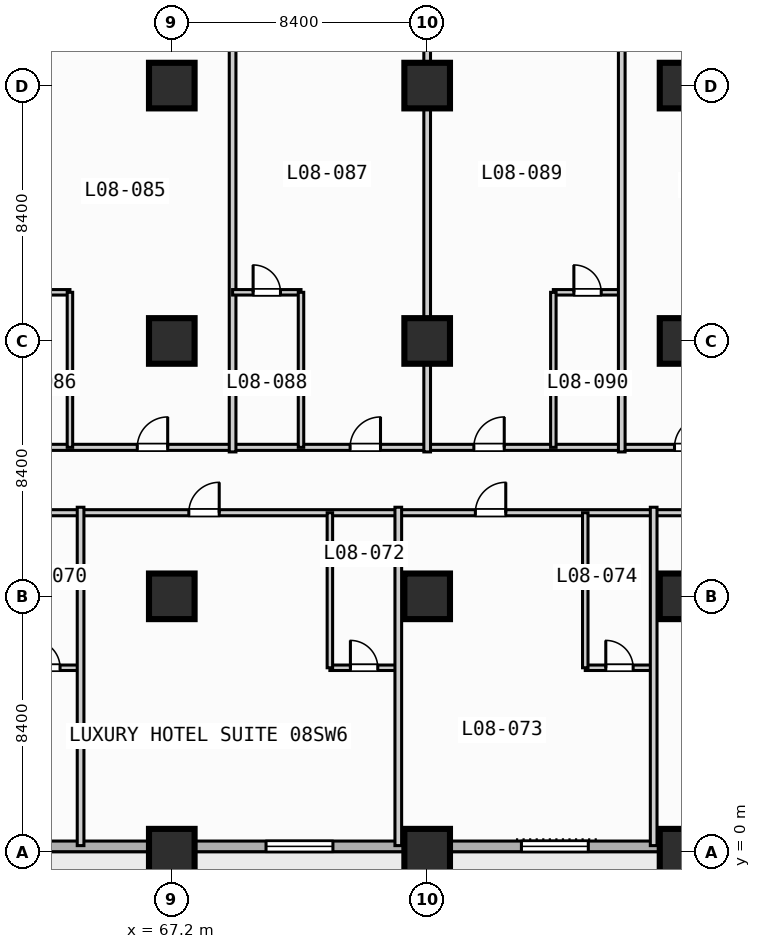
"""IFC4 building model, lengths in metres.
Left out: names, types, materials, properties, quantities, classifications, styles, units other than length and angle.
Written with IfcOpenShell. Run it as: python <this file> out.ifc"""

import sys

from ifc_helpers import new_model, si_unit, direction, frame, frame_2d, origin, origin_2d, place, context, subcontext, project, spatial, rectangle, extrude, element, fill, save


model = new_model("IFC4")
c1 = context("Model", 3, precision=1e-05, world=origin(), true_north=direction((0.0, 1.0)))
c2 = subcontext(c1, "Body", "Model", "MODEL_VIEW")
j1 = project(units=[si_unit("LENGTHUNIT", "METRE"), si_unit("PLANEANGLEUNIT", "RADIAN")], contexts=[c1])
p1 = place(None, origin())
s1 = spatial("IfcSite", under=j1, at=p1, CompositionType="ELEMENT")
p2 = place(p1, origin())
s2 = spatial("IfcBuilding", under=s1, at=p2, CompositionType="ELEMENT")
p3 = place(p2, frame((0.0, 0.0, 39.6)))
s3 = spatial("IfcBuildingStorey", under=s2, at=p3, CompositionType="ELEMENT", Elevation=39.6)
for number, where, z_axis, x_axis in (
    (1, (67.2, 0.0, 0.0), (0.0, 0.0, 1.0), (1.0, 0.0, 0.0)),
    (2, (67.2, 8.4, 0.0), (0.0, 0.0, 1.0), (1.0, 0.0, 0.0)),
    (3, (67.2, 16.8, 0.0), (0.0, 0.0, 1.0), (1.0, 0.0, 0.0)),
    (4, (67.2, 25.2, 0.0), (0.0, 0.0, 1.0), (1.0, 0.0, 0.0)),
    (5, (75.6, 0.0, 0.0), (0.0, 0.0, 1.0), (1.0, 0.0, 0.0)),
    (6, (75.6, 8.4, 0.0), (0.0, 0.0, 1.0), (1.0, 0.0, 0.0)),
    (7, (75.6, 16.8, 0.0), (0.0, 0.0, 1.0), (1.0, 0.0, 0.0)),
    (8, (75.6, 25.2, 0.0), (0.0, 0.0, 1.0), (1.0, 0.0, 0.0)),
    (9, (84.0, 0.0, 0.0), (0.0, 0.0, 1.0), (1.0, 0.0, 0.0)),
    (10, (84.0, 8.4, 0.0), (0.0, 0.0, 1.0), (1.0, 0.0, 0.0)),
    (11, (84.0, 16.8, 0.0), (0.0, 0.0, 1.0), (1.0, 0.0, 0.0)),
    (12, (84.0, 25.2, 0.0), (0.0, 0.0, 1.0), (1.0, 0.0, 0.0)),
):
    element("IfcColumn", number, at=place(p3, frame(where, z_axis=z_axis, x_axis=x_axis)), inside=s3, PredefinedType="COLUMN", context=c2, shape_type="SweptSolid", body=[
        extrude(rectangle(XDim=1.5, YDim=1.5, at=origin_2d()), origin(), (0.0, 0.0, 1.0), 3.8),
    ])
p4 = place(p3, frame((89.225, 0.175, 0.0), z_axis=(0.0, 0.0, 1.0), x_axis=(-1.0, 0.0, 0.0)))
e13 = element("IfcWall", 13, at=p4, inside=s3, PredefinedType="STANDARD", context=c2, shape_type="SweptSolid", body=[
    extrude(rectangle(XDim=86.05, YDim=0.35, at=frame_2d((43.025, 0.0))), origin(), (0.0, 0.0, 1.0), 3.55),
])
p5 = place(p4, frame((67.525, 0.0, 0.0)))
e14 = element("IfcOpeningElement", 14, at=p5, cuts=e13, PredefinedType="OPENING", context=c2, shape_type="SweptSolid", body=[
    extrude(rectangle(XDim=1.4, YDim=2.2, at=frame_2d((0.7, 1.1))), frame((0.0, 0.185, 0.0), z_axis=(0.0, -1.0, 0.0), x_axis=(1.0, 0.0, 0.0)), (0.0, 0.0, 1.0), 0.37),
])
p6 = place(p4, frame((58.725, 0.0, 0.85)))
e15 = element("IfcOpeningElement", 15, at=p6, cuts=e13, PredefinedType="OPENING", context=c2, shape_type="SweptSolid", body=[
    extrude(rectangle(XDim=2.2, YDim=1.8, at=frame_2d((1.1, 0.9))), frame((0.0, 0.185, 0.0), z_axis=(0.0, -1.0, 0.0), x_axis=(1.0, 0.0, 0.0)), (0.0, 0.0, 1.0), 0.37),
])
p7 = place(p4, frame((50.325, 0.0, 0.85)))
e16 = element("IfcOpeningElement", 16, at=p7, cuts=e13, PredefinedType="OPENING", context=c2, shape_type="SweptSolid", body=[
    extrude(rectangle(XDim=2.2, YDim=1.8, at=frame_2d((1.1, 0.9))), frame((0.0, 0.185, 0.0), z_axis=(0.0, -1.0, 0.0), x_axis=(1.0, 0.0, 0.0)), (0.0, 0.0, 1.0), 0.37),
])
p8 = place(p4, frame((41.925, 0.0, 0.85)))
e17 = element("IfcOpeningElement", 17, at=p8, cuts=e13, PredefinedType="OPENING", context=c2, shape_type="SweptSolid", body=[
    extrude(rectangle(XDim=2.2, YDim=1.8, at=frame_2d((1.1, 0.9))), frame((0.0, 0.185, 0.0), z_axis=(0.0, -1.0, 0.0), x_axis=(1.0, 0.0, 0.0)), (0.0, 0.0, 1.0), 0.37),
])
p9 = place(p4, frame((33.525, 0.0, 0.85)))
e18 = element("IfcOpeningElement", 18, at=p9, cuts=e13, PredefinedType="OPENING", context=c2, shape_type="SweptSolid", body=[
    extrude(rectangle(XDim=2.2, YDim=1.8, at=frame_2d((1.1, 0.9))), frame((0.0, 0.185, 0.0), z_axis=(0.0, -1.0, 0.0), x_axis=(1.0, 0.0, 0.0)), (0.0, 0.0, 1.0), 0.37),
])
p10 = place(p4, frame((16.725, 0.0, 0.85)))
e19 = element("IfcOpeningElement", 19, at=p10, cuts=e13, PredefinedType="OPENING", context=c2, shape_type="SweptSolid", body=[
    extrude(rectangle(XDim=2.2, YDim=1.8, at=frame_2d((1.1, 0.9))), frame((0.0, 0.185, 0.0), z_axis=(0.0, -1.0, 0.0), x_axis=(1.0, 0.0, 0.0)), (0.0, 0.0, 1.0), 0.37),
])
p11 = place(p4, frame((8.325, 0.0, 0.85)))
e20 = element("IfcOpeningElement", 20, at=p11, cuts=e13, PredefinedType="OPENING", context=c2, shape_type="SweptSolid", body=[
    extrude(rectangle(XDim=2.2, YDim=1.8, at=frame_2d((1.1, 0.9))), frame((0.0, 0.185, 0.0), z_axis=(0.0, -1.0, 0.0), x_axis=(1.0, 0.0, 0.0)), (0.0, 0.0, 1.0), 0.37),
])
p12 = place(p4, frame((2.4, 0.0, 0.85)))
e21 = element("IfcOpeningElement", 21, at=p12, cuts=e13, PredefinedType="OPENING", context=c2, shape_type="SweptSolid", body=[
    extrude(rectangle(XDim=1.8, YDim=1.8, at=frame_2d((0.9, 0.9))), frame((0.0, 0.185, 0.0), z_axis=(0.0, -1.0, 0.0), x_axis=(1.0, 0.0, 0.0)), (0.0, 0.0, 1.0), 0.37),
])
p13 = place(p3, frame((13.4, 11.15, 0.0), z_axis=(0.0, 0.0, 1.0), x_axis=(1.0, 0.0, 0.0)))
e22 = element("IfcWall", 22, at=p13, inside=s3, PredefinedType="PARTITIONING", context=c2, shape_type="SweptSolid", body=[
    extrude(rectangle(XDim=75.4, YDim=0.2, at=frame_2d((37.7, 0.0))), origin(), (0.0, 0.0, 1.0), 3.55),
])
p14 = place(p13, frame((6.065, 0.0, 0.0)))
e23 = element("IfcOpeningElement", 23, at=p14, cuts=e22, PredefinedType="OPENING", context=c2, shape_type="SweptSolid", body=[
    extrude(rectangle(XDim=1.0, YDim=2.15, at=frame_2d((0.5, 1.075))), frame((0.0, 0.11, 0.0), z_axis=(0.0, -1.0, 0.0), x_axis=(1.0, 0.0, 0.0)), (0.0, 0.0, 1.0), 0.22),
])
p15 = place(p13, frame((13.36, 0.0, 0.0)))
e24 = element("IfcOpeningElement", 24, at=p15, cuts=e22, PredefinedType="OPENING", context=c2, shape_type="SweptSolid", body=[
    extrude(rectangle(XDim=1.0, YDim=2.15, at=frame_2d((0.5, 1.075))), frame((0.0, 0.11, 0.0), z_axis=(0.0, -1.0, 0.0), x_axis=(1.0, 0.0, 0.0)), (0.0, 0.0, 1.0), 0.22),
])
p16 = place(p13, frame((21.785, 0.0, 0.0)))
e25 = element("IfcOpeningElement", 25, at=p16, cuts=e22, PredefinedType="OPENING", context=c2, shape_type="SweptSolid", body=[
    extrude(rectangle(XDim=1.0, YDim=2.15, at=frame_2d((0.5, 1.075))), frame((0.0, 0.11, 0.0), z_axis=(0.0, -1.0, 0.0), x_axis=(1.0, 0.0, 0.0)), (0.0, 0.0, 1.0), 0.22),
])
p17 = place(p13, frame((30.185, 0.0, 0.0)))
e26 = element("IfcOpeningElement", 26, at=p17, cuts=e22, PredefinedType="OPENING", context=c2, shape_type="SweptSolid", body=[
    extrude(rectangle(XDim=1.0, YDim=2.15, at=frame_2d((0.5, 1.075))), frame((0.0, 0.11, 0.0), z_axis=(0.0, -1.0, 0.0), x_axis=(1.0, 0.0, 0.0)), (0.0, 0.0, 1.0), 0.22),
])
p18 = place(p13, frame((41.76, 0.0, 0.0)))
e27 = element("IfcOpeningElement", 27, at=p18, cuts=e22, PredefinedType="OPENING", context=c2, shape_type="SweptSolid", body=[
    extrude(rectangle(XDim=1.0, YDim=2.15, at=frame_2d((0.5, 1.075))), frame((0.0, 0.11, 0.0), z_axis=(0.0, -1.0, 0.0), x_axis=(1.0, 0.0, 0.0)), (0.0, 0.0, 1.0), 0.22),
])
p19 = place(p13, frame((54.36, 0.0, 0.0)))
e28 = element("IfcOpeningElement", 28, at=p19, cuts=e22, PredefinedType="OPENING", context=c2, shape_type="SweptSolid", body=[
    extrude(rectangle(XDim=1.0, YDim=2.15, at=frame_2d((0.5, 1.075))), frame((0.0, 0.11, 0.0), z_axis=(0.0, -1.0, 0.0), x_axis=(1.0, 0.0, 0.0)), (0.0, 0.0, 1.0), 0.22),
])
p20 = place(p13, frame((63.785, 0.0, 0.0)))
e29 = element("IfcOpeningElement", 29, at=p20, cuts=e22, PredefinedType="OPENING", context=c2, shape_type="SweptSolid", body=[
    extrude(rectangle(XDim=1.0, YDim=2.15, at=frame_2d((0.5, 1.075))), frame((0.0, 0.11, 0.0), z_axis=(0.0, -1.0, 0.0), x_axis=(1.0, 0.0, 0.0)), (0.0, 0.0, 1.0), 0.22),
])
p21 = place(p13, frame((70.86, 0.0, 0.0)))
e30 = element("IfcOpeningElement", 30, at=p21, cuts=e22, PredefinedType="OPENING", context=c2, shape_type="SweptSolid", body=[
    extrude(rectangle(XDim=1.0, YDim=2.15, at=frame_2d((0.5, 1.075))), frame((0.0, 0.11, 0.0), z_axis=(0.0, -1.0, 0.0), x_axis=(1.0, 0.0, 0.0)), (0.0, 0.0, 1.0), 0.22),
])
p22 = place(p3, frame((61.95, 6.05, 0.0), z_axis=(0.0, 0.0, 1.0), x_axis=(1.0, 0.0, 0.0)))
e31 = element("IfcWall", 31, at=p22, inside=s3, PredefinedType="PLUMBINGWALL", context=c2, shape_type="SweptSolid", body=[
    extrude(rectangle(XDim=2.25, YDim=0.18, at=frame_2d((1.125, 0.0))), origin(), (0.0, 0.0, 1.0), 3.55),
])
p23 = place(p22, frame((0.675, 0.0, 0.0)))
e32 = element("IfcOpeningElement", 32, at=p23, cuts=e31, PredefinedType="OPENING", context=c2, shape_type="SweptSolid", body=[
    extrude(rectangle(XDim=0.9, YDim=2.1, at=frame_2d((0.45, 1.05))), frame((0.0, 0.1, 0.0), z_axis=(0.0, -1.0, 0.0), x_axis=(1.0, 0.0, 0.0)), (0.0, 0.0, 1.0), 0.2),
])
p24 = place(p3, frame((64.2, 0.2, 0.0), z_axis=(0.0, 0.0, 1.0), x_axis=(0.0, 1.0, 0.0)))
e33 = element("IfcWall", 33, at=p24, inside=s3, PredefinedType="PARTITIONING", context=c2, shape_type="SweptSolid", body=[
    extrude(rectangle(XDim=11.13, YDim=0.22, at=frame_2d((5.565, 0.0))), origin(), (0.0, 0.0, 1.0), 3.55),
])
p25 = place(p3, frame((72.4, 6.05, 0.0), z_axis=(0.0, 0.0, 1.0), x_axis=(1.0, 0.0, 0.0)))
e34 = element("IfcWall", 34, at=p25, inside=s3, PredefinedType="PLUMBINGWALL", context=c2, shape_type="SweptSolid", body=[
    extrude(rectangle(XDim=2.25, YDim=0.18, at=frame_2d((1.125, 0.0))), origin(), (0.0, 0.0, 1.0), 3.55),
])
p26 = place(p25, frame((0.675, 0.0, 0.0)))
e35 = element("IfcOpeningElement", 35, at=p26, cuts=e34, PredefinedType="OPENING", context=c2, shape_type="SweptSolid", body=[
    extrude(rectangle(XDim=0.9, YDim=2.1, at=frame_2d((0.45, 1.05))), frame((0.0, 0.1, 0.0), z_axis=(0.0, -1.0, 0.0), x_axis=(1.0, 0.0, 0.0)), (0.0, 0.0, 1.0), 0.2),
])
p27 = place(p3, frame((72.4, 6.05, 0.0), z_axis=(0.0, 0.0, 1.0), x_axis=(0.0, 1.0, 0.0)))
e36 = element("IfcWall", 36, at=p27, inside=s3, PredefinedType="PLUMBINGWALL", context=c2, shape_type="SweptSolid", body=[
    extrude(rectangle(XDim=5.1, YDim=0.18, at=frame_2d((2.55, 0.0))), origin(), (0.0, 0.0, 1.0), 3.55),
])
p28 = place(p3, frame((74.65, 0.2, 0.0), z_axis=(0.0, 0.0, 1.0), x_axis=(0.0, 1.0, 0.0)))
e37 = element("IfcWall", 37, at=p28, inside=s3, PredefinedType="PARTITIONING", context=c2, shape_type="SweptSolid", body=[
    extrude(rectangle(XDim=11.13, YDim=0.22, at=frame_2d((5.565, 0.0))), origin(), (0.0, 0.0, 1.0), 3.55),
])
p29 = place(p3, frame((80.8, 6.05, 0.0), z_axis=(0.0, 0.0, 1.0), x_axis=(1.0, 0.0, 0.0)))
e38 = element("IfcWall", 38, at=p29, inside=s3, PredefinedType="PLUMBINGWALL", context=c2, shape_type="SweptSolid", body=[
    extrude(rectangle(XDim=2.25, YDim=0.18, at=frame_2d((1.125, 0.0))), origin(), (0.0, 0.0, 1.0), 3.55),
])
p30 = place(p29, frame((0.675, 0.0, 0.0)))
e39 = element("IfcOpeningElement", 39, at=p30, cuts=e38, PredefinedType="OPENING", context=c2, shape_type="SweptSolid", body=[
    extrude(rectangle(XDim=0.9, YDim=2.1, at=frame_2d((0.45, 1.05))), frame((0.0, 0.1, 0.0), z_axis=(0.0, -1.0, 0.0), x_axis=(1.0, 0.0, 0.0)), (0.0, 0.0, 1.0), 0.2),
])
p31 = place(p3, frame((80.8, 6.05, 0.0), z_axis=(0.0, 0.0, 1.0), x_axis=(0.0, 1.0, 0.0)))
e40 = element("IfcWall", 40, at=p31, inside=s3, PredefinedType="PLUMBINGWALL", context=c2, shape_type="SweptSolid", body=[
    extrude(rectangle(XDim=5.1, YDim=0.18, at=frame_2d((2.55, 0.0))), origin(), (0.0, 0.0, 1.0), 3.55),
])
p32 = place(p3, frame((83.05, 0.2, 0.0), z_axis=(0.0, 0.0, 1.0), x_axis=(0.0, 1.0, 0.0)))
e41 = element("IfcWall", 41, at=p32, inside=s3, PredefinedType="PARTITIONING", context=c2, shape_type="SweptSolid", body=[
    extrude(rectangle(XDim=11.13, YDim=0.22, at=frame_2d((5.565, 0.0))), origin(), (0.0, 0.0, 1.0), 3.55),
])
p33 = place(p3, frame((61.6, 13.3, 0.0), z_axis=(0.0, 0.0, 1.0), x_axis=(1.0, 0.0, 0.0)))
e42 = element("IfcWall", 42, at=p33, inside=s3, PredefinedType="PARTITIONING", context=c2, shape_type="SweptSolid", body=[
    extrude(rectangle(XDim=27.2, YDim=0.2, at=frame_2d((13.6, 0.0))), origin(), (0.0, 0.0, 1.0), 3.55),
])
p34 = place(p33, frame((4.465, 0.0, 0.0)))
e43 = element("IfcOpeningElement", 43, at=p34, cuts=e42, PredefinedType="OPENING", context=c2, shape_type="SweptSolid", body=[
    extrude(rectangle(XDim=1.0, YDim=2.15, at=frame_2d((0.5, 1.075))), frame((0.0, 0.11, 0.0), z_axis=(0.0, -1.0, 0.0), x_axis=(1.0, 0.0, 0.0)), (0.0, 0.0, 1.0), 0.22),
])
p35 = place(p33, frame((11.465, 0.0, 0.0)))
e44 = element("IfcOpeningElement", 44, at=p35, cuts=e42, PredefinedType="OPENING", context=c2, shape_type="SweptSolid", body=[
    extrude(rectangle(XDim=1.0, YDim=2.15, at=frame_2d((0.5, 1.075))), frame((0.0, 0.11, 0.0), z_axis=(0.0, -1.0, 0.0), x_axis=(1.0, 0.0, 0.0)), (0.0, 0.0, 1.0), 0.22),
])
p36 = place(p33, frame((15.535, 0.0, 0.0)))
e45 = element("IfcOpeningElement", 45, at=p36, cuts=e42, PredefinedType="OPENING", context=c2, shape_type="SweptSolid", body=[
    extrude(rectangle(XDim=1.0, YDim=2.15, at=frame_2d((0.5, 1.075))), frame((0.0, 0.11, 0.0), z_axis=(0.0, -1.0, 0.0), x_axis=(1.0, 0.0, 0.0)), (0.0, 0.0, 1.0), 0.22),
])
p37 = place(p33, frame((22.135, 0.0, 0.0)))
e46 = element("IfcOpeningElement", 46, at=p37, cuts=e42, PredefinedType="OPENING", context=c2, shape_type="SweptSolid", body=[
    extrude(rectangle(XDim=1.0, YDim=2.15, at=frame_2d((0.5, 1.075))), frame((0.0, 0.11, 0.0), z_axis=(0.0, -1.0, 0.0), x_axis=(1.0, 0.0, 0.0)), (0.0, 0.0, 1.0), 0.22),
])
p38 = place(p3, frame((61.6, 18.4, 0.0), z_axis=(0.0, 0.0, 1.0), x_axis=(1.0, 0.0, 0.0)))
e47 = element("IfcWall", 47, at=p38, inside=s3, PredefinedType="PLUMBINGWALL", context=c2, shape_type="SweptSolid", body=[
    extrude(rectangle(XDim=2.25, YDim=0.18, at=frame_2d((1.125, 0.0))), origin(), (0.0, 0.0, 1.0), 3.55),
])
p39 = place(p38, frame((0.675, 0.0, 0.0)))
e48 = element("IfcOpeningElement", 48, at=p39, cuts=e47, PredefinedType="OPENING", context=c2, shape_type="SweptSolid", body=[
    extrude(rectangle(XDim=0.9, YDim=2.1, at=frame_2d((0.45, 1.05))), frame((0.0, 0.1, 0.0), z_axis=(0.0, -1.0, 0.0), x_axis=(1.0, 0.0, 0.0)), (0.0, 0.0, 1.0), 0.2),
])
p40 = place(p3, frame((63.85, 13.3, 0.0), z_axis=(0.0, 0.0, 1.0), x_axis=(0.0, 1.0, 0.0)))
e49 = element("IfcWall", 49, at=p40, inside=s3, PredefinedType="PLUMBINGWALL", context=c2, shape_type="SweptSolid", body=[
    extrude(rectangle(XDim=5.1, YDim=0.18, at=frame_2d((2.55, 0.0))), origin(), (0.0, 0.0, 1.0), 3.55),
])
p41 = place(p3, frame((69.2, 13.15, 0.0), z_axis=(0.0, 0.0, 1.0), x_axis=(0.0, 1.0, 0.0)))
e50 = element("IfcWall", 50, at=p41, inside=s3, PredefinedType="PARTITIONING", context=c2, shape_type="SweptSolid", body=[
    extrude(rectangle(XDim=20.28, YDim=0.22, at=frame_2d((10.14, 0.0))), origin(), (0.0, 0.0, 1.0), 3.55),
])
p42 = place(p3, frame((69.2, 18.4, 0.0), z_axis=(0.0, 0.0, 1.0), x_axis=(1.0, 0.0, 0.0)))
e51 = element("IfcWall", 51, at=p42, inside=s3, PredefinedType="PLUMBINGWALL", context=c2, shape_type="SweptSolid", body=[
    extrude(rectangle(XDim=2.25, YDim=0.18, at=frame_2d((1.125, 0.0))), origin(), (0.0, 0.0, 1.0), 3.55),
])
p43 = place(p42, frame((0.675, 0.0, 0.0)))
e52 = element("IfcOpeningElement", 52, at=p43, cuts=e51, PredefinedType="OPENING", context=c2, shape_type="SweptSolid", body=[
    extrude(rectangle(XDim=0.9, YDim=2.1, at=frame_2d((0.45, 1.05))), frame((0.0, 0.1, 0.0), z_axis=(0.0, -1.0, 0.0), x_axis=(1.0, 0.0, 0.0)), (0.0, 0.0, 1.0), 0.2),
])
p44 = place(p3, frame((71.45, 13.3, 0.0), z_axis=(0.0, 0.0, 1.0), x_axis=(0.0, 1.0, 0.0)))
e53 = element("IfcWall", 53, at=p44, inside=s3, PredefinedType="PLUMBINGWALL", context=c2, shape_type="SweptSolid", body=[
    extrude(rectangle(XDim=5.1, YDim=0.18, at=frame_2d((2.55, 0.0))), origin(), (0.0, 0.0, 1.0), 3.55),
])
p45 = place(p3, frame((75.6, 13.15, 0.0), z_axis=(0.0, 0.0, 1.0), x_axis=(0.0, 1.0, 0.0)))
e54 = element("IfcWall", 54, at=p45, inside=s3, PredefinedType="PARTITIONING", context=c2, shape_type="SweptSolid", body=[
    extrude(rectangle(XDim=20.28, YDim=0.22, at=frame_2d((10.14, 0.0))), origin(), (0.0, 0.0, 1.0), 2.8),
])
p46 = place(p3, frame((79.75, 18.4, 0.0), z_axis=(0.0, 0.0, 1.0), x_axis=(1.0, 0.0, 0.0)))
e55 = element("IfcWall", 55, at=p46, inside=s3, PredefinedType="PLUMBINGWALL", context=c2, shape_type="SweptSolid", body=[
    extrude(rectangle(XDim=2.25, YDim=0.18, at=frame_2d((1.125, 0.0))), origin(), (0.0, 0.0, 1.0), 3.55),
])
p47 = place(p46, frame((0.675, 0.0, 0.0)))
e56 = element("IfcOpeningElement", 56, at=p47, cuts=e55, PredefinedType="OPENING", context=c2, shape_type="SweptSolid", body=[
    extrude(rectangle(XDim=0.9, YDim=2.1, at=frame_2d((0.45, 1.05))), frame((0.0, 0.1, 0.0), z_axis=(0.0, -1.0, 0.0), x_axis=(1.0, 0.0, 0.0)), (0.0, 0.0, 1.0), 0.2),
])
p48 = place(p3, frame((79.75, 13.3, 0.0), z_axis=(0.0, 0.0, 1.0), x_axis=(0.0, 1.0, 0.0)))
e57 = element("IfcWall", 57, at=p48, inside=s3, PredefinedType="PLUMBINGWALL", context=c2, shape_type="SweptSolid", body=[
    extrude(rectangle(XDim=5.1, YDim=0.18, at=frame_2d((2.55, 0.0))), origin(), (0.0, 0.0, 1.0), 3.55),
])
p49 = place(p3, frame((82.0, 13.15, 0.0), z_axis=(0.0, 0.0, 1.0), x_axis=(0.0, 1.0, 0.0)))
e58 = element("IfcWall", 58, at=p49, inside=s3, PredefinedType="PARTITIONING", context=c2, shape_type="SweptSolid", body=[
    extrude(rectangle(XDim=20.28, YDim=0.22, at=frame_2d((10.14, 0.0))), origin(), (0.0, 0.0, 1.0), 3.55),
])
p50 = place(p10, origin())
e59 = element("IfcWindow", 59, at=p50, inside=s3, PartitioningType="SINGLE_PANEL", PredefinedType="WINDOW", context=c2, shape_type="SweptSolid", body=[
    extrude(rectangle(XDim=2.2, YDim=1.8, at=frame_2d((1.1, 0.9))), frame((0.0, 0.03, 0.0), z_axis=(0.0, -1.0, 0.0), x_axis=(1.0, 0.0, 0.0)), (0.0, 0.0, 1.0), 0.06),
])
fill(e19, e59)
p51 = place(p11, origin())
e60 = element("IfcWindow", 60, at=p51, inside=s3, PartitioningType="SINGLE_PANEL", PredefinedType="WINDOW", context=c2, shape_type="SweptSolid", body=[
    extrude(rectangle(XDim=2.2, YDim=1.8, at=frame_2d((1.1, 0.9))), frame((0.0, 0.03, 0.0), z_axis=(0.0, -1.0, 0.0), x_axis=(1.0, 0.0, 0.0)), (0.0, 0.0, 1.0), 0.06),
])
fill(e20, e60)
p52 = place(p19, origin())
e61 = element("IfcDoor", 61, at=p52, inside=s3, OperationType="SINGLE_SWING_RIGHT", PredefinedType="DOOR", context=c2, shape_type="SweptSolid", body=[
    extrude(rectangle(XDim=1.0, YDim=2.15, at=frame_2d((0.5, 1.075))), frame((0.0, 0.025, 0.0), z_axis=(0.0, -1.0, 0.0), x_axis=(1.0, 0.0, 0.0)), (0.0, 0.0, 1.0), 0.05),
])
fill(e28, e61)
p53 = place(p20, origin())
e62 = element("IfcDoor", 62, at=p53, inside=s3, OperationType="SINGLE_SWING_RIGHT", PredefinedType="DOOR", context=c2, shape_type="SweptSolid", body=[
    extrude(rectangle(XDim=1.0, YDim=2.15, at=frame_2d((0.5, 1.075))), frame((0.0, 0.025, 0.0), z_axis=(0.0, -1.0, 0.0), x_axis=(1.0, 0.0, 0.0)), (0.0, 0.0, 1.0), 0.05),
])
fill(e29, e62)
p54 = place(p23, origin())
e63 = element("IfcDoor", 63, at=p54, inside=s3, OperationType="SINGLE_SWING_LEFT", PredefinedType="DOOR", context=c2, shape_type="SweptSolid", body=[
    extrude(rectangle(XDim=0.9, YDim=2.1, at=frame_2d((0.45, 1.05))), frame((0.0, 0.025, 0.0), z_axis=(0.0, -1.0, 0.0), x_axis=(1.0, 0.0, 0.0)), (0.0, 0.0, 1.0), 0.05),
])
fill(e32, e63)
p55 = place(p26, origin())
e64 = element("IfcDoor", 64, at=p55, inside=s3, OperationType="SINGLE_SWING_LEFT", PredefinedType="DOOR", context=c2, shape_type="SweptSolid", body=[
    extrude(rectangle(XDim=0.9, YDim=2.1, at=frame_2d((0.45, 1.05))), frame((0.0, 0.025, 0.0), z_axis=(0.0, -1.0, 0.0), x_axis=(1.0, 0.0, 0.0)), (0.0, 0.0, 1.0), 0.05),
])
fill(e35, e64)
p56 = place(p30, origin())
e65 = element("IfcDoor", 65, at=p56, inside=s3, OperationType="SINGLE_SWING_LEFT", PredefinedType="DOOR", context=c2, shape_type="SweptSolid", body=[
    extrude(rectangle(XDim=0.9, YDim=2.1, at=frame_2d((0.45, 1.05))), frame((0.0, 0.025, 0.0), z_axis=(0.0, -1.0, 0.0), x_axis=(1.0, 0.0, 0.0)), (0.0, 0.0, 1.0), 0.05),
])
fill(e39, e65)
p57 = place(p34, origin())
e66 = element("IfcDoor", 66, at=p57, inside=s3, OperationType="SINGLE_SWING_RIGHT", PredefinedType="DOOR", context=c2, shape_type="SweptSolid", body=[
    extrude(rectangle(XDim=1.0, YDim=2.15, at=frame_2d((0.5, 1.075))), frame((0.0, 0.025, 0.0), z_axis=(0.0, -1.0, 0.0), x_axis=(1.0, 0.0, 0.0)), (0.0, 0.0, 1.0), 0.05),
])
fill(e43, e66)
p58 = place(p35, origin())
e67 = element("IfcDoor", 67, at=p58, inside=s3, OperationType="SINGLE_SWING_RIGHT", PredefinedType="DOOR", context=c2, shape_type="SweptSolid", body=[
    extrude(rectangle(XDim=1.0, YDim=2.15, at=frame_2d((0.5, 1.075))), frame((0.0, 0.025, 0.0), z_axis=(0.0, -1.0, 0.0), x_axis=(1.0, 0.0, 0.0)), (0.0, 0.0, 1.0), 0.05),
])
fill(e44, e67)
p59 = place(p36, origin())
e68 = element("IfcDoor", 68, at=p59, inside=s3, OperationType="SINGLE_SWING_RIGHT", PredefinedType="DOOR", context=c2, shape_type="SweptSolid", body=[
    extrude(rectangle(XDim=1.0, YDim=2.15, at=frame_2d((0.5, 1.075))), frame((0.0, 0.025, 0.0), z_axis=(0.0, -1.0, 0.0), x_axis=(1.0, 0.0, 0.0)), (0.0, 0.0, 1.0), 0.05),
])
fill(e45, e68)
p60 = place(p37, origin())
e69 = element("IfcDoor", 69, at=p60, inside=s3, OperationType="SINGLE_SWING_RIGHT", PredefinedType="DOOR", context=c2, shape_type="SweptSolid", body=[
    extrude(rectangle(XDim=1.0, YDim=2.15, at=frame_2d((0.5, 1.075))), frame((0.0, 0.025, 0.0), z_axis=(0.0, -1.0, 0.0), x_axis=(1.0, 0.0, 0.0)), (0.0, 0.0, 1.0), 0.05),
])
fill(e46, e69)
p61 = place(p43, origin())
e70 = element("IfcDoor", 70, at=p61, inside=s3, OperationType="SINGLE_SWING_LEFT", PredefinedType="DOOR", context=c2, shape_type="SweptSolid", body=[
    extrude(rectangle(XDim=0.9, YDim=2.1, at=frame_2d((0.45, 1.05))), frame((0.0, 0.025, 0.0), z_axis=(0.0, -1.0, 0.0), x_axis=(1.0, 0.0, 0.0)), (0.0, 0.0, 1.0), 0.05),
])
fill(e52, e70)
p62 = place(p47, origin())
e71 = element("IfcDoor", 71, at=p62, inside=s3, OperationType="SINGLE_SWING_LEFT", PredefinedType="DOOR", context=c2, shape_type="SweptSolid", body=[
    extrude(rectangle(XDim=0.9, YDim=2.1, at=frame_2d((0.45, 1.05))), frame((0.0, 0.025, 0.0), z_axis=(0.0, -1.0, 0.0), x_axis=(1.0, 0.0, 0.0)), (0.0, 0.0, 1.0), 0.05),
])
fill(e56, e71)
save(model, sys.argv[1])
